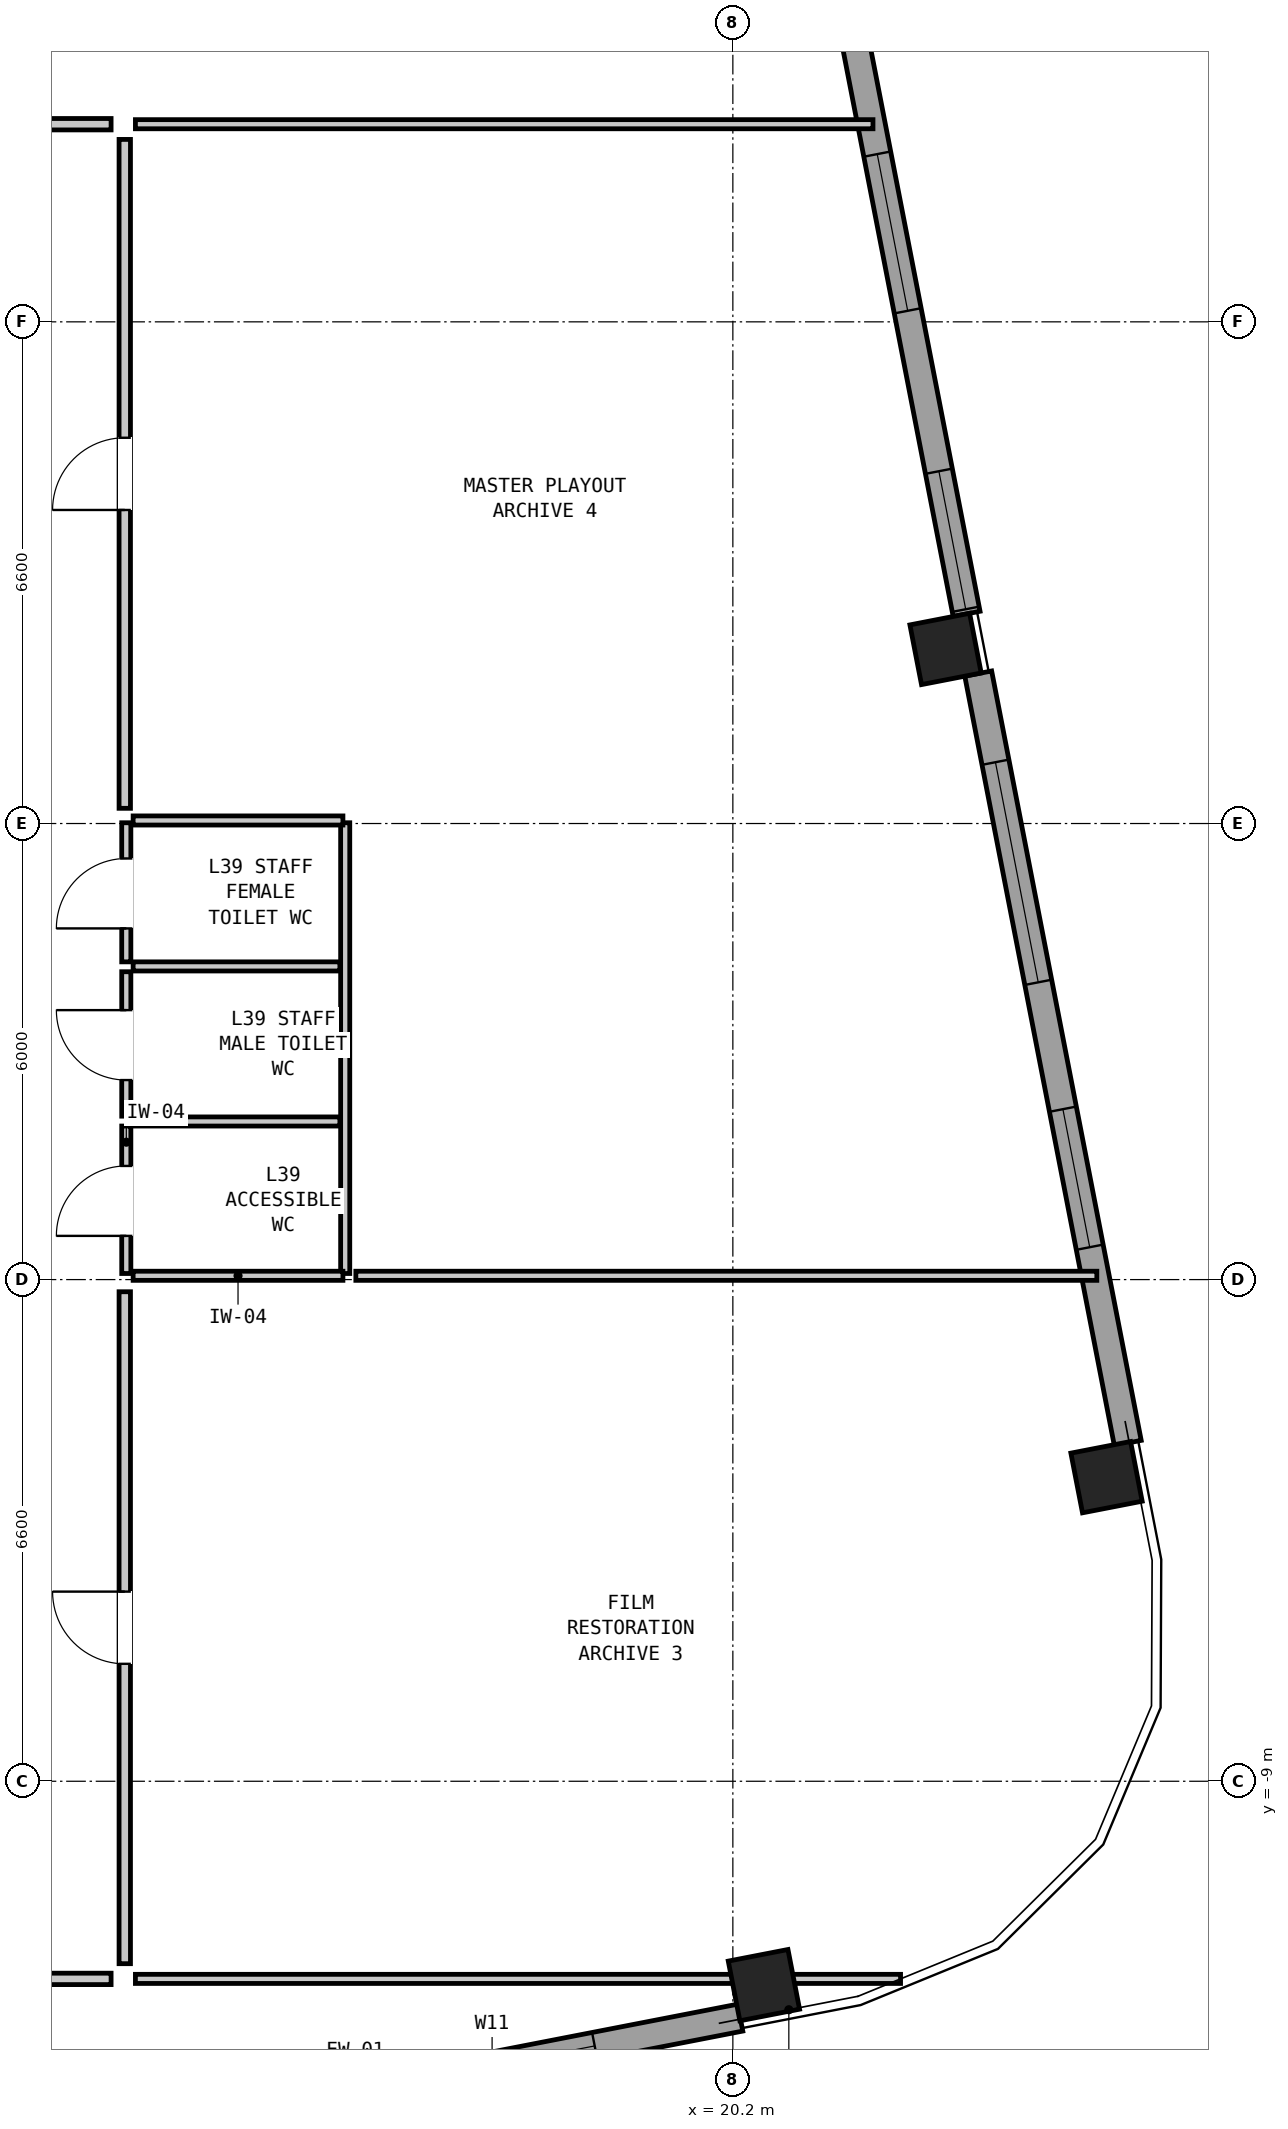
"""IFC4 building model, lengths in metres.
Left out: names, types, materials, properties, quantities, classifications, styles, units other than length and angle.
Written with IfcOpenShell. Run it as: python <this file> out.ifc"""

import sys

from ifc_helpers import new_model, si_unit, direction, frame, frame_2d, origin, origin_2d, place, context, subcontext, project, spatial, rectangle, hollow_rectangle, extrude, element, fill, save


model = new_model("IFC4")
c1 = context("Model", 3, precision=1e-05, world=origin(), true_north=direction((0.0, 1.0)))
c2 = subcontext(c1, "Body", "Model", "MODEL_VIEW")
j1 = project(units=[si_unit("LENGTHUNIT", "METRE"), si_unit("PLANEANGLEUNIT", "RADIAN")], contexts=[c1])
p1 = place(None, origin())
s1 = spatial("IfcSite", under=j1, at=p1, CompositionType="ELEMENT")
p2 = place(p1, origin())
s2 = spatial("IfcBuilding", under=s1, at=p2, CompositionType="ELEMENT")
p3 = place(p2, frame((0.0, 0.0, 134.15)))
s3 = spatial("IfcBuildingStorey", under=s2, at=p3, CompositionType="ELEMENT", Elevation=134.15)
for number, where, z_axis, x_axis in (
    (1, (20.609, -11.682, 0.0), (0.0, 0.0, 1.0), (0.982, 0.191, 0.0)),
    (2, (25.116, -5.0, 0.0), (0.0, 0.0, 1.0), (-0.191, 0.982, 0.0)),
    (3, (22.998, 5.896, 0.0), (0.0, 0.0, 1.0), (-0.191, 0.982, 0.0)),
):
    element("IfcColumn", number, at=place(p3, frame(where, z_axis=z_axis, x_axis=x_axis)), inside=s3, PredefinedType="COLUMN", context=c2, shape_type="SweptSolid", body=[
        extrude(hollow_rectangle(XDim=0.8, YDim=0.8, WallThickness=0.05, at=origin_2d()), origin(), (0.0, 0.0, 1.0), 3.05),
    ])
p4 = place(p3, frame((20.296, -12.11, 0.0), z_axis=(0.0, 0.0, 1.0), x_axis=(-0.981628941133, -0.190799952646, 0.0)))
e4 = element("IfcWall", 4, at=p4, inside=s3, PredefinedType="SOLIDWALL", context=c2, shape_type="SweptSolid", body=[
    extrude(rectangle(XDim=10.312, YDim=0.36, at=frame_2d((5.156, 0.0))), origin(), (0.0, 0.0, 1.0), 2.067),
])
p5 = place(p4, frame((1.95, 0.0, 0.2)))
e5 = element("IfcOpeningElement", 5, at=p5, cuts=e4, PredefinedType="OPENING", context=c2, shape_type="SweptSolid", body=[
    extrude(rectangle(XDim=2.75, YDim=0.95, at=frame_2d((1.375, 0.475))), frame((0.0, 0.192, 0.0), z_axis=(0.0, -1.0, 0.0), x_axis=(1.0, 0.0, 0.0)), (0.0, 0.0, 1.0), 0.384),
])
p6 = place(p4, frame((6.25, 0.0, 0.95)))
e6 = element("IfcOpeningElement", 6, at=p6, cuts=e4, PredefinedType="OPENING", context=c2, shape_type="SweptSolid", body=[
    extrude(rectangle(XDim=2.75, YDim=0.95, at=frame_2d((1.375, 0.475))), frame((0.0, 0.192, 0.0), z_axis=(0.0, -1.0, 0.0), x_axis=(1.0, 0.0, 0.0)), (0.0, 0.0, 1.0), 0.384),
])
p7 = place(p3, frame((21.31, 16.469, 0.0), z_axis=(0.0, 0.0, 1.0), x_axis=(0.190811924826, -0.981626614016, 0.0)))
e7 = element("IfcWall", 7, at=p7, inside=s3, PredefinedType="SOLIDWALL", context=c2, shape_type="SweptSolid", body=[
    extrude(rectangle(XDim=10.3, YDim=0.36, at=frame_2d((5.15, 0.0))), origin(), (0.0, 0.0, 1.0), 2.067),
])
p8 = place(p7, frame((0.038, 0.0, 0.2)))
e8 = element("IfcOpeningElement", 8, at=p8, cuts=e7, PredefinedType="OPENING", context=c2, shape_type="SweptSolid", body=[
    extrude(rectangle(XDim=1.8, YDim=1.25, at=frame_2d((0.9, 0.625))), frame((0.0, 0.192, 0.0), z_axis=(0.0, -1.0, 0.0), x_axis=(1.0, 0.0, 0.0)), (0.0, 0.0, 1.0), 0.384),
])
p9 = place(p7, frame((4.138, 0.0, 0.7)))
e9 = element("IfcOpeningElement", 9, at=p9, cuts=e7, PredefinedType="OPENING", context=c2, shape_type="SweptSolid", body=[
    extrude(rectangle(XDim=2.1, YDim=1.2, at=frame_2d((1.05, 0.6))), frame((0.0, 0.192, 0.0), z_axis=(0.0, -1.0, 0.0), x_axis=(1.0, 0.0, 0.0)), (0.0, 0.0, 1.0), 0.384),
])
p10 = place(p7, frame((8.388, 0.0, 0.2)))
e10 = element("IfcOpeningElement", 10, at=p10, cuts=e7, PredefinedType="OPENING", context=c2, shape_type="SweptSolid", body=[
    extrude(rectangle(XDim=1.85, YDim=1.2, at=frame_2d((0.925, 0.6))), frame((0.0, 0.192, 0.0), z_axis=(0.0, -1.0, 0.0), x_axis=(1.0, 0.0, 0.0)), (0.0, 0.0, 1.0), 0.384),
])
p11 = place(p3, frame((23.428, 5.573, 0.0), z_axis=(0.0, 0.0, 1.0), x_axis=(0.190827200853, -0.981623644486, 0.0)))
e11 = element("IfcWall", 11, at=p11, inside=s3, PredefinedType="SOLIDWALL", context=c2, shape_type="SweptSolid", body=[
    extrude(rectangle(XDim=10.312, YDim=0.36, at=frame_2d((5.156, 0.0))), origin(), (0.0, 0.0, 1.0), 2.067),
])
p12 = place(p11, frame((1.188, 0.0, 0.95)))
e12 = element("IfcOpeningElement", 12, at=p12, cuts=e11, PredefinedType="OPENING", context=c2, shape_type="SweptSolid", body=[
    extrude(rectangle(XDim=2.95, YDim=0.95, at=frame_2d((1.475, 0.475))), frame((0.0, 0.192, 0.0), z_axis=(0.0, -1.0, 0.0), x_axis=(1.0, 0.0, 0.0)), (0.0, 0.0, 1.0), 0.384),
])
p13 = place(p11, frame((5.838, 0.0, 0.2)))
e13 = element("IfcOpeningElement", 13, at=p13, cuts=e11, PredefinedType="OPENING", context=c2, shape_type="SweptSolid", body=[
    extrude(rectangle(XDim=1.85, YDim=1.15, at=frame_2d((0.925, 0.575))), frame((0.0, 0.192, 0.0), z_axis=(0.0, -1.0, 0.0), x_axis=(1.0, 0.0, 0.0)), (0.0, 0.0, 1.0), 0.384),
])
p14 = place(p3, frame((12.22, -2.32, 0.0), z_axis=(0.0, 0.0, 1.0), x_axis=(0.0, 1.0, 0.0)))
e14 = element("IfcWall", 14, at=p14, inside=s3, PredefinedType="PARTITIONING", context=c2, shape_type="SweptSolid", body=[
    extrude(rectangle(XDim=1.94, YDim=0.12, at=frame_2d((0.97, 0.0))), origin(), (0.0, 0.0, 1.0), 2.83),
])
p15 = place(p14, frame((0.495, 0.0, 0.0)))
e15 = element("IfcOpeningElement", 15, at=p15, cuts=e14, PredefinedType="OPENING", context=c2, shape_type="SweptSolid", body=[
    extrude(rectangle(XDim=0.92, YDim=2.1, at=frame_2d((0.46, 1.05))), frame((0.0, 0.072, 0.0), z_axis=(0.0, -1.0, 0.0), x_axis=(1.0, 0.0, 0.0)), (0.0, 0.0, 1.0), 0.144),
])
p16 = place(p3, frame((12.22, -0.25, 0.0), z_axis=(0.0, 0.0, 1.0), x_axis=(0.0, 1.0, 0.0)))
e16 = element("IfcWall", 16, at=p16, inside=s3, PredefinedType="PARTITIONING", context=c2, shape_type="SweptSolid", body=[
    extrude(rectangle(XDim=1.9, YDim=0.12, at=frame_2d((0.95, 0.0))), origin(), (0.0, 0.0, 1.0), 2.83),
])
p17 = place(p16, frame((0.475, 0.0, 0.0)))
e17 = element("IfcOpeningElement", 17, at=p17, cuts=e16, PredefinedType="OPENING", context=c2, shape_type="SweptSolid", body=[
    extrude(rectangle(XDim=0.92, YDim=2.1, at=frame_2d((0.46, 1.05))), frame((0.0, 0.072, 0.0), z_axis=(0.0, -1.0, 0.0), x_axis=(1.0, 0.0, 0.0)), (0.0, 0.0, 1.0), 0.144),
])
p18 = place(p3, frame((12.22, 1.78, 0.0), z_axis=(0.0, 0.0, 1.0), x_axis=(0.0, 1.0, 0.0)))
e18 = element("IfcWall", 18, at=p18, inside=s3, PredefinedType="PARTITIONING", context=c2, shape_type="SweptSolid", body=[
    extrude(rectangle(XDim=1.83, YDim=0.12, at=frame_2d((0.915, 0.0))), origin(), (0.0, 0.0, 1.0), 2.83),
])
p19 = place(p18, frame((0.44, 0.0, 0.0)))
e19 = element("IfcOpeningElement", 19, at=p19, cuts=e18, PredefinedType="OPENING", context=c2, shape_type="SweptSolid", body=[
    extrude(rectangle(XDim=0.92, YDim=2.1, at=frame_2d((0.46, 1.05))), frame((0.0, 0.072, 0.0), z_axis=(0.0, -1.0, 0.0), x_axis=(1.0, 0.0, 0.0)), (0.0, 0.0, 1.0), 0.144),
])
p20 = place(p3, frame((15.1, -2.32, 0.0), z_axis=(0.0, 0.0, 1.0), x_axis=(0.0, 1.0, 0.0)))
e20 = element("IfcWall", 20, at=p20, inside=s3, PredefinedType="PARTITIONING", context=c2, shape_type="SweptSolid", body=[
    extrude(rectangle(XDim=5.93, YDim=0.12, at=frame_2d((2.965, 0.0))), origin(), (0.0, 0.0, 1.0), 2.83),
])
for number, where, z_axis, x_axis in (
    (21, (12.31, -2.35, 0.0), (0.0, 0.0, 1.0), (1.0, 0.0, 0.0)),
    (22, (12.31, 3.64, 0.0), (0.0, 0.0, 1.0), (1.0, 0.0, 0.0)),
):
    element("IfcWall", number, at=place(p3, frame(where, z_axis=z_axis, x_axis=x_axis)), inside=s3, PredefinedType="PARTITIONING", context=c2, shape_type="SweptSolid", body=[
        extrude(rectangle(XDim=2.76, YDim=0.12, at=frame_2d((1.38, 0.0))), origin(), (0.0, 0.0, 1.0), 1.883),
    ])
for number, where, z_axis, x_axis in (
    (23, (12.31, -0.32, 0.0), (0.0, 0.0, 1.0), (1.0, 0.0, 0.0)),
    (24, (12.31, 1.72, 0.0), (0.0, 0.0, 1.0), (1.0, 0.0, 0.0)),
):
    element("IfcWall", number, at=place(p3, frame(where, z_axis=z_axis, x_axis=x_axis)), inside=s3, PredefinedType="PARTITIONING", context=c2, shape_type="SweptSolid", body=[
        extrude(rectangle(XDim=2.72, YDim=0.12, at=frame_2d((1.36, 0.0))), origin(), (0.0, 0.0, 1.0), 2.83),
    ])
p21 = place(p3, frame((12.34, 12.8, 0.0), z_axis=(0.0, 0.0, 1.0), x_axis=(1.0, 0.0, 0.0)))
e25 = element("IfcWall", 25, at=p21, inside=s3, PredefinedType="PARTITIONING", context=c2, shape_type="SweptSolid", body=[
    extrude(rectangle(XDim=9.703, YDim=0.12, at=frame_2d((4.852, 0.0))), origin(), (0.0, 0.0, 1.0), 2.83),
])
p22 = place(p3, frame((12.34, -11.6, 0.0), z_axis=(0.0, 0.0, 1.0), x_axis=(1.0, 0.0, 0.0)))
e26 = element("IfcWall", 26, at=p22, inside=s3, PredefinedType="PARTITIONING", context=c2, shape_type="SweptSolid", body=[
    extrude(rectangle(XDim=10.066, YDim=0.12, at=frame_2d((5.033, 0.0))), origin(), (0.0, 0.0, 1.0), 2.127),
])
p23 = place(p3, frame((15.24, -2.35, 0.0), z_axis=(0.0, 0.0, 1.0), x_axis=(1.0, 0.0, 0.0)))
e27 = element("IfcWall", 27, at=p23, inside=s3, PredefinedType="PARTITIONING", context=c2, shape_type="SweptSolid", body=[
    extrude(rectangle(XDim=9.748, YDim=0.12, at=frame_2d((4.874, 0.0))), origin(), (0.0, 0.0, 1.0), 1.883),
])
p24 = place(p3, frame((6.68, 12.8, 0.0), z_axis=(0.0, 0.0, 1.0), x_axis=(1.0, 0.0, 0.0)))
e28 = element("IfcWall", 28, at=p24, inside=s3, PredefinedType="PARTITIONING", context=c2, shape_type="SweptSolid", body=[
    extrude(rectangle(XDim=5.34, YDim=0.15, at=frame_2d((2.67, 0.0))), origin(), (0.0, 0.0, 1.0), 2.83),
])
p25 = place(p24, frame((1.395, 0.0, 0.0)))
e29 = element("IfcOpeningElement", 29, at=p25, cuts=e28, PredefinedType="OPENING", context=c2, shape_type="SweptSolid", body=[
    extrude(rectangle(XDim=0.95, YDim=2.1, at=frame_2d((0.475, 1.05))), frame((0.0, 0.087, 0.0), z_axis=(0.0, -1.0, 0.0), x_axis=(1.0, 0.0, 0.0)), (0.0, 0.0, 1.0), 0.174),
])
p26 = place(p3, frame((7.68, -11.6, 0.0), z_axis=(0.0, 0.0, 1.0), x_axis=(1.0, 0.0, 0.0)))
e30 = element("IfcWall", 30, at=p26, inside=s3, PredefinedType="PARTITIONING", context=c2, shape_type="SweptSolid", body=[
    extrude(rectangle(XDim=4.34, YDim=0.15, at=frame_2d((2.17, 0.0))), origin(), (0.0, 0.0, 1.0), 2.347),
])
p27 = place(p26, frame((2.095, 0.0, 0.0)))
e31 = element("IfcOpeningElement", 31, at=p27, cuts=e30, PredefinedType="OPENING", context=c2, shape_type="SweptSolid", body=[
    extrude(rectangle(XDim=0.95, YDim=2.1, at=frame_2d((0.475, 1.05))), frame((0.0, 0.087, 0.0), z_axis=(0.0, -1.0, 0.0), x_axis=(1.0, 0.0, 0.0)), (0.0, 0.0, 1.0), 0.174),
])
p28 = place(p3, frame((12.2, -11.4, 0.0), z_axis=(0.0, 0.0, 1.0), x_axis=(0.0, 1.0, 0.0)))
e32 = element("IfcWall", 32, at=p28, inside=s3, PredefinedType="PARTITIONING", context=c2, shape_type="SweptSolid", body=[
    extrude(rectangle(XDim=8.84, YDim=0.15, at=frame_2d((4.42, 0.0))), origin(), (0.0, 0.0, 1.0), 2.83),
])
p29 = place(p28, frame((3.945, 0.0, 0.0)))
e33 = element("IfcOpeningElement", 33, at=p29, cuts=e32, PredefinedType="OPENING", context=c2, shape_type="SweptSolid", body=[
    extrude(rectangle(XDim=0.95, YDim=2.1, at=frame_2d((0.475, 1.05))), frame((0.0, 0.087, 0.0), z_axis=(0.0, -1.0, 0.0), x_axis=(1.0, 0.0, 0.0)), (0.0, 0.0, 1.0), 0.174),
])
p30 = place(p3, frame((12.2, 3.8, 0.0), z_axis=(0.0, 0.0, 1.0), x_axis=(0.0, 1.0, 0.0)))
e34 = element("IfcWall", 34, at=p30, inside=s3, PredefinedType="PARTITIONING", context=c2, shape_type="SweptSolid", body=[
    extrude(rectangle(XDim=8.8, YDim=0.15, at=frame_2d((4.4, 0.0))), origin(), (0.0, 0.0, 1.0), 2.83),
])
p31 = place(p30, frame((3.925, 0.0, 0.0)))
e35 = element("IfcOpeningElement", 35, at=p31, cuts=e34, PredefinedType="OPENING", context=c2, shape_type="SweptSolid", body=[
    extrude(rectangle(XDim=0.95, YDim=2.1, at=frame_2d((0.475, 1.05))), frame((0.0, 0.087, 0.0), z_axis=(0.0, -1.0, 0.0), x_axis=(1.0, 0.0, 0.0)), (0.0, 0.0, 1.0), 0.174),
])
p32 = place(p5, origin())
e36 = element("IfcWindow", 36, at=p32, inside=s3, PartitioningType="SINGLE_PANEL", PredefinedType="WINDOW", context=c2, shape_type="SweptSolid", body=[
    extrude(rectangle(XDim=2.75, YDim=0.95, at=frame_2d((1.375, 0.475))), frame((0.0, 0.03, 0.0), z_axis=(0.0, -1.0, 0.0), x_axis=(1.0, 0.0, 0.0)), (0.0, 0.0, 1.0), 0.06),
])
fill(e5, e36)
p33 = place(p9, origin())
e37 = element("IfcWindow", 37, at=p33, inside=s3, PartitioningType="SINGLE_PANEL", PredefinedType="WINDOW", context=c2, shape_type="SweptSolid", body=[
    extrude(rectangle(XDim=2.1, YDim=1.2, at=frame_2d((1.05, 0.6))), frame((0.0, 0.03, 0.0), z_axis=(0.0, -1.0, 0.0), x_axis=(1.0, 0.0, 0.0)), (0.0, 0.0, 1.0), 0.06),
])
fill(e9, e37)
p34 = place(p10, origin())
e38 = element("IfcWindow", 38, at=p34, inside=s3, PartitioningType="SINGLE_PANEL", PredefinedType="WINDOW", context=c2, shape_type="SweptSolid", body=[
    extrude(rectangle(XDim=1.85, YDim=1.2, at=frame_2d((0.925, 0.6))), frame((0.0, 0.03, 0.0), z_axis=(0.0, -1.0, 0.0), x_axis=(1.0, 0.0, 0.0)), (0.0, 0.0, 1.0), 0.06),
])
fill(e10, e38)
p35 = place(p12, origin())
e39 = element("IfcWindow", 39, at=p35, inside=s3, PartitioningType="SINGLE_PANEL", PredefinedType="WINDOW", context=c2, shape_type="SweptSolid", body=[
    extrude(rectangle(XDim=2.95, YDim=0.95, at=frame_2d((1.475, 0.475))), frame((0.0, 0.03, 0.0), z_axis=(0.0, -1.0, 0.0), x_axis=(1.0, 0.0, 0.0)), (0.0, 0.0, 1.0), 0.06),
])
fill(e12, e39)
p36 = place(p13, origin())
e40 = element("IfcWindow", 40, at=p36, inside=s3, PartitioningType="SINGLE_PANEL", PredefinedType="WINDOW", context=c2, shape_type="SweptSolid", body=[
    extrude(rectangle(XDim=1.85, YDim=1.15, at=frame_2d((0.925, 0.575))), frame((0.0, 0.03, 0.0), z_axis=(0.0, -1.0, 0.0), x_axis=(1.0, 0.0, 0.0)), (0.0, 0.0, 1.0), 0.06),
])
fill(e13, e40)
p37 = place(p15, origin())
e41 = element("IfcDoor", 41, at=p37, inside=s3, OperationType="SINGLE_SWING_LEFT", PredefinedType="DOOR", context=c2, shape_type="SweptSolid", body=[
    extrude(rectangle(XDim=0.92, YDim=2.1, at=frame_2d((0.46, 1.05))), frame((0.0, 0.025, 0.0), z_axis=(0.0, -1.0, 0.0), x_axis=(1.0, 0.0, 0.0)), (0.0, 0.0, 1.0), 0.05),
])
fill(e15, e41)
p38 = place(p17, origin())
e42 = element("IfcDoor", 42, at=p38, inside=s3, OperationType="SINGLE_SWING_RIGHT", PredefinedType="DOOR", context=c2, shape_type="SweptSolid", body=[
    extrude(rectangle(XDim=0.92, YDim=2.1, at=frame_2d((0.46, 1.05))), frame((0.0, 0.025, 0.0), z_axis=(0.0, -1.0, 0.0), x_axis=(1.0, 0.0, 0.0)), (0.0, 0.0, 1.0), 0.05),
])
fill(e17, e42)
p39 = place(p19, origin())
e43 = element("IfcDoor", 43, at=p39, inside=s3, OperationType="SINGLE_SWING_LEFT", PredefinedType="DOOR", context=c2, shape_type="SweptSolid", body=[
    extrude(rectangle(XDim=0.92, YDim=2.1, at=frame_2d((0.46, 1.05))), frame((0.0, 0.025, 0.0), z_axis=(0.0, -1.0, 0.0), x_axis=(1.0, 0.0, 0.0)), (0.0, 0.0, 1.0), 0.05),
])
fill(e19, e43)
p40 = place(p29, origin())
e44 = element("IfcDoor", 44, at=p40, inside=s3, OperationType="SINGLE_SWING_RIGHT", PredefinedType="DOOR", context=c2, shape_type="SweptSolid", body=[
    extrude(rectangle(XDim=0.95, YDim=2.1, at=frame_2d((0.475, 1.05))), frame((0.0, 0.025, 0.0), z_axis=(0.0, -1.0, 0.0), x_axis=(1.0, 0.0, 0.0)), (0.0, 0.0, 1.0), 0.05),
])
fill(e33, e44)
p41 = place(p31, origin())
e45 = element("IfcDoor", 45, at=p41, inside=s3, OperationType="SINGLE_SWING_LEFT", PredefinedType="DOOR", context=c2, shape_type="SweptSolid", body=[
    extrude(rectangle(XDim=0.95, YDim=2.1, at=frame_2d((0.475, 1.05))), frame((0.0, 0.025, 0.0), z_axis=(0.0, -1.0, 0.0), x_axis=(1.0, 0.0, 0.0)), (0.0, 0.0, 1.0), 0.05),
])
fill(e35, e45)
save(model, sys.argv[1])
